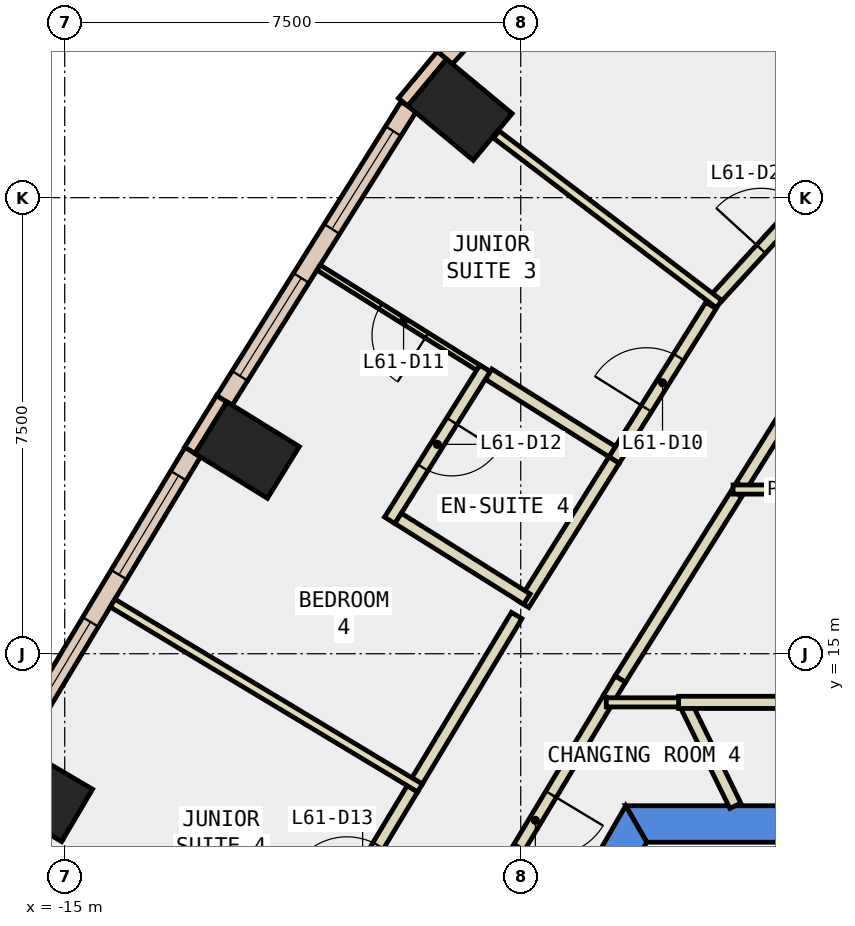
"""IFC4 building model, lengths in metres.
Left out: names, types, materials, properties, quantities, classifications, styles, units other than length and angle.
Written with IfcOpenShell. Run it as: python <this file> out.ifc"""

import sys

from ifc_helpers import new_model, si_unit, direction, frame, frame_2d, origin, origin_2d, place, context, subcontext, project, spatial, polyline, rectangle, outline, extrude, element, fill, save


model = new_model("IFC4")
c1 = context("Model", 3, precision=1e-05, world=origin(), true_north=direction((0.0, 1.0)))
c2 = subcontext(c1, "Body", "Model", "MODEL_VIEW")
j1 = project(units=[si_unit("LENGTHUNIT", "METRE"), si_unit("PLANEANGLEUNIT", "RADIAN")], contexts=[c1])
p1 = place(None, origin())
s1 = spatial("IfcSite", under=j1, at=p1, CompositionType="ELEMENT")
p2 = place(p1, origin())
s2 = spatial("IfcBuilding", under=s1, at=p2, CompositionType="ELEMENT")
p3 = place(p2, frame((0.0, 0.0, 266.6)))
s3 = spatial("IfcBuildingStorey", under=s2, at=p3, CompositionType="ELEMENT", Elevation=266.6)
for number, where, z_axis, x_axis in (
    (1, (-8.5, 23.946, -0.34), (0.0, 0.0, 1.0), (0.639, 0.769, 0.0)),
    (2, (-11.999, 18.349, -0.34), (0.0, 0.0, 1.0), (0.526, 0.851, 0.0)),
    (3, (-15.399, 12.697, -0.34), (0.0, 0.0, 1.0), (0.509, 0.861, 0.0)),
):
    element("IfcColumn", number, at=place(p3, frame(where, z_axis=z_axis, x_axis=x_axis)), inside=s3, PredefinedType="COLUMN", context=c2, shape_type="SweptSolid", body=[
        extrude(rectangle(XDim=1.0, YDim=1.4, at=origin_2d()), origin(), (0.0, 0.0, 1.0), 3.6),
    ])
p4 = place(p3, frame((0.0, 0.0, -0.34)))
e4 = element("IfcWall", 4, at=p4, inside=s3, PredefinedType="SHEAR", context=c2, shape_type="SweptSolid", body=[
    extrude(outline(polyline([(5.774, 12.5), (-5.774, 12.5), (-5.427, 11.9), (5.427, 11.9), (5.774, 12.5)])), origin(), (0.0, 0.0, 1.0), 3.6),
])
p5 = place(p3, frame((0.0, 0.0, -0.34)))
e5 = element("IfcWall", 5, at=p5, inside=s3, PredefinedType="SHEAR", context=c2, shape_type="SweptSolid", body=[
    extrude(outline(polyline([(-10.535, 4.253), (-10.015, 3.953), (-5.427, 11.9), (-5.774, 12.5), (-10.535, 4.253)])), origin(), (0.0, 0.0, 1.0), 3.6),
])
p6 = place(p3, frame((-8.796, 24.842, 0.0), z_axis=(0.0, 0.0, 1.0), x_axis=(-0.638117112481, -0.769939316283, 0.0)))
e6 = element("IfcWall", 6, at=p6, inside=s3, PredefinedType="STANDARD", context=c2, shape_type="SweptSolid", body=[
    extrude(rectangle(XDim=1.0, YDim=0.2, at=frame_2d((0.5, 0.0))), origin(), (0.0, 0.0, 1.0), 3.26),
])
p7 = place(p3, frame((-12.417, 19.195, 0.0), z_axis=(0.0, 0.0, 1.0), x_axis=(-0.525825307325, -0.850592585306, 0.0)))
e7 = element("IfcWall", 7, at=p7, inside=s3, PredefinedType="STANDARD", context=c2, shape_type="SweptSolid", body=[
    extrude(rectangle(XDim=1.0, YDim=0.2, at=frame_2d((0.5, 0.0))), origin(), (0.0, 0.0, 1.0), 3.26),
])
p8 = place(p3, frame((-5.782, 28.025, 0.0), z_axis=(0.0, 0.0, 1.0), x_axis=(-0.675143863554, -0.737686087374, 0.0)))
e8 = element("IfcWall", 8, at=p8, inside=s3, PredefinedType="STANDARD", context=c2, shape_type="SweptSolid", body=[
    extrude(rectangle(XDim=4.38, YDim=0.3, at=frame_2d((2.19, 0.0))), origin(), (0.0, 0.0, 1.0), 3.26),
])
p9 = place(p8, frame((1.49, 0.0, 0.9)))
e9 = element("IfcOpeningElement", 9, at=p9, cuts=e8, PredefinedType="OPENING", context=c2, shape_type="SweptSolid", body=[
    extrude(rectangle(XDim=1.4, YDim=2.0, at=frame_2d((0.7, 1.0))), frame((0.0, 0.16, 0.0), z_axis=(0.0, -1.0, 0.0), x_axis=(1.0, 0.0, 0.0)), (0.0, 0.0, 1.0), 0.32),
])
p10 = place(p3, frame((-9.343, 23.998, 0.0), z_axis=(0.0, 0.0, 1.0), x_axis=(-0.531137483242, -0.847285650708, 0.0)))
e10 = element("IfcWall", 10, at=p10, inside=s3, PredefinedType="STANDARD", context=c2, shape_type="SweptSolid", body=[
    extrude(rectangle(XDim=5.703, YDim=0.3, at=frame_2d((2.852, 0.0))), origin(), (0.0, 0.0, 1.0), 3.26),
])
p11 = place(p10, frame((0.476, 0.0, 0.9)))
e11 = element("IfcOpeningElement", 11, at=p11, cuts=e10, PredefinedType="OPENING", context=c2, shape_type="SweptSolid", body=[
    extrude(rectangle(XDim=1.9, YDim=2.0, at=frame_2d((0.95, 1.0))), frame((0.0, 0.16, 0.0), z_axis=(0.0, -1.0, 0.0), x_axis=(1.0, 0.0, 0.0)), (0.0, 0.0, 1.0), 0.32),
])
p12 = place(p10, frame((3.327, 0.0, 0.9)))
e12 = element("IfcOpeningElement", 12, at=p12, cuts=e10, PredefinedType="OPENING", context=c2, shape_type="SweptSolid", body=[
    extrude(rectangle(XDim=1.9, YDim=2.0, at=frame_2d((0.95, 1.0))), frame((0.0, 0.16, 0.0), z_axis=(0.0, -1.0, 0.0), x_axis=(1.0, 0.0, 0.0)), (0.0, 0.0, 1.0), 0.32),
])
p13 = place(p3, frame((-12.895, 18.316, 0.0), z_axis=(0.0, 0.0, 1.0), x_axis=(-0.515435742129, -0.856928232547, 0.0)))
e13 = element("IfcWall", 13, at=p13, inside=s3, PredefinedType="STANDARD", context=c2, shape_type="SweptSolid", body=[
    extrude(rectangle(XDim=5.613, YDim=0.3, at=frame_2d((2.806, 0.0))), origin(), (0.0, 0.0, 1.0), 3.26),
])
p14 = place(p13, frame((0.453, 0.0, 0.9)))
e14 = element("IfcOpeningElement", 14, at=p14, cuts=e13, PredefinedType="OPENING", context=c2, shape_type="SweptSolid", body=[
    extrude(rectangle(XDim=1.9, YDim=2.0, at=frame_2d((0.95, 1.0))), frame((0.0, 0.16, 0.0), z_axis=(0.0, -1.0, 0.0), x_axis=(1.0, 0.0, 0.0)), (0.0, 0.0, 1.0), 0.32),
])
p15 = place(p13, frame((3.26, 0.0, 0.9)))
e15 = element("IfcOpeningElement", 15, at=p15, cuts=e13, PredefinedType="OPENING", context=c2, shape_type="SweptSolid", body=[
    extrude(rectangle(XDim=1.9, YDim=2.0, at=frame_2d((0.95, 1.0))), frame((0.0, 0.16, 0.0), z_axis=(0.0, -1.0, 0.0), x_axis=(1.0, 0.0, 0.0)), (0.0, 0.0, 1.0), 0.32),
])
p16 = place(p3, frame((-3.97, 12.5, 0.0), z_axis=(0.0, 0.0, 1.0), x_axis=(-0.440355460167, 0.89782351757, 0.0)))
e16 = element("IfcWall", 16, at=p16, inside=s3, PredefinedType="PARTITIONING", context=c2, shape_type="SweptSolid", body=[
    extrude(rectangle(XDim=1.869, YDim=0.2, at=frame_2d((0.935, 0.0))), origin(), (0.0, 0.0, 1.0), 3.26),
])
p17 = place(p3, frame((-6.054, 14.264, 0.0), z_axis=(0.0, 0.0, 1.0), x_axis=(-0.515508653897, -0.856884372455, 0.0)))
e17 = element("IfcWall", 17, at=p17, inside=s3, PredefinedType="PARTITIONING", context=c2, shape_type="SweptSolid", body=[
    extrude(rectangle(XDim=4.677, YDim=0.2, at=frame_2d((2.339, 0.0))), origin(), (0.0, 0.0, 1.0), 3.26),
])
p18 = place(p17, frame((1.839, 0.0, 0.0)))
e18 = element("IfcOpeningElement", 18, at=p18, cuts=e17, PredefinedType="OPENING", context=c2, shape_type="SweptSolid", body=[
    extrude(rectangle(XDim=1.0, YDim=2.1, at=frame_2d((0.5, 1.05))), frame((0.0, 0.11, 0.0), z_axis=(0.0, -1.0, 0.0), x_axis=(1.0, 0.0, 0.0)), (0.0, 0.0, 1.0), 0.22),
])
p19 = place(p3, frame((-4.904, 14.2, 0.0), z_axis=(0.0, 0.0, 1.0), x_axis=(1.0, 0.0, 0.0)))
e19 = element("IfcWall", 19, at=p19, inside=s3, PredefinedType="PARTITIONING", context=c2, shape_type="SweptSolid", body=[
    extrude(rectangle(XDim=4.504, YDim=0.2, at=frame_2d((2.252, 0.0))), origin(), (0.0, 0.0, 1.0), 3.26),
])
p20 = place(p3, frame((-3.948, 17.636, 0.0), z_axis=(0.0, 0.0, 1.0), x_axis=(-0.531380509042, -0.847133256702, 0.0)))
e20 = element("IfcWall", 20, at=p20, inside=s3, PredefinedType="PARTITIONING", context=c2, shape_type="SweptSolid", body=[
    extrude(rectangle(XDim=3.604, YDim=0.2, at=frame_2d((1.802, 0.0))), origin(), (0.0, 0.0, 1.0), 3.26),
])
p21 = place(p3, frame((-5.863, 14.583, 0.0), z_axis=(0.0, 0.0, 1.0), x_axis=(-0.513433271491, -0.858129521533, 0.0)))
e21 = element("IfcWall", 21, at=p21, inside=s3, PredefinedType="PARTITIONING", context=c2, shape_type="SweptSolid", body=[
    extrude(rectangle(XDim=0.372, YDim=0.2, at=frame_2d((0.186, 0.0))), origin(), (0.0, 0.0, 1.0), 3.26),
])
p22 = place(p3, frame((-2.773, 19.511, 0.0), z_axis=(0.0, 0.0, 1.0), x_axis=(-0.531062870102, -0.847332418829, 0.0)))
e22 = element("IfcWall", 22, at=p22, inside=s3, PredefinedType="PARTITIONING", context=c2, shape_type="SweptSolid", body=[
    extrude(rectangle(XDim=2.062, YDim=0.2, at=frame_2d((1.031, 0.0))), origin(), (0.0, 0.0, 1.0), 3.26),
])
p23 = place(p3, frame((-4.335, 20.793, 0.0), z_axis=(0.0, 0.0, 1.0), x_axis=(0.675074517272, 0.737749548377, 0.0)))
e23 = element("IfcWall", 23, at=p23, inside=s3, PredefinedType="PARTITIONING", context=c2, shape_type="SweptSolid", body=[
    extrude(rectangle(XDim=3.334, YDim=0.2, at=frame_2d((1.667, 0.0))), origin(), (0.0, 0.0, 1.0), 3.26),
])
p24 = place(p23, frame((1.167, 0.0, 0.0)))
e24 = element("IfcOpeningElement", 24, at=p24, cuts=e23, PredefinedType="OPENING", context=c2, shape_type="SweptSolid", body=[
    extrude(rectangle(XDim=1.0, YDim=2.1, at=frame_2d((0.5, 1.05))), frame((0.0, 0.11, 0.0), z_axis=(0.0, -1.0, 0.0), x_axis=(1.0, 0.0, 0.0)), (0.0, 0.0, 1.0), 0.22),
])
p25 = place(p3, frame((-5.965, 18.185, 0.0), z_axis=(0.0, 0.0, 1.0), x_axis=(0.531256372055, 0.847211111324, 0.0)))
e25 = element("IfcWall", 25, at=p25, inside=s3, PredefinedType="PARTITIONING", context=c2, shape_type="SweptSolid", body=[
    extrude(rectangle(XDim=3.0, YDim=0.2, at=frame_2d((1.5, 0.0))), origin(), (0.0, 0.0, 1.0), 3.26),
])
p26 = place(p25, frame((1.0, 0.0, 0.0)))
e26 = element("IfcOpeningElement", 26, at=p26, cuts=e25, PredefinedType="OPENING", context=c2, shape_type="SweptSolid", body=[
    extrude(rectangle(XDim=1.0, YDim=2.1, at=frame_2d((0.5, 1.05))), frame((0.0, 0.11, 0.0), z_axis=(0.0, -1.0, 0.0), x_axis=(1.0, 0.0, 0.0)), (0.0, 0.0, 1.0), 0.22),
])
p27 = place(p3, frame((-9.204, 12.908, 0.0), z_axis=(0.0, 0.0, 1.0), x_axis=(0.51556943596, 0.856847802532, 0.0)))
e27 = element("IfcWall", 27, at=p27, inside=s3, PredefinedType="PARTITIONING", context=c2, shape_type="SweptSolid", body=[
    extrude(rectangle(XDim=3.176, YDim=0.2, at=frame_2d((1.588, 0.0))), origin(), (0.0, 0.0, 1.0), 3.26),
])
p28 = place(p3, frame((-7.452, 15.813, 0.0), z_axis=(0.0, 0.0, 1.0), x_axis=(0.531095943551, 0.847311689252, 0.0)))
e28 = element("IfcWall", 28, at=p28, inside=s3, PredefinedType="PARTITIONING", context=c2, shape_type="SweptSolid", body=[
    extrude(rectangle(XDim=2.8, YDim=0.2, at=frame_2d((1.4, 0.0))), origin(), (0.0, 0.0, 1.0), 3.26),
])
p29 = place(p3, frame((-10.919, 10.057, 0.0), z_axis=(0.0, 0.0, 1.0), x_axis=(0.515568955032, 0.856848091908, 0.0)))
e29 = element("IfcWall", 29, at=p29, inside=s3, PredefinedType="PARTITIONING", context=c2, shape_type="SweptSolid", body=[
    extrude(rectangle(XDim=3.177, YDim=0.2, at=frame_2d((1.588, 0.0))), origin(), (0.0, 0.0, 1.0), 3.26),
])
p30 = place(p29, frame((1.088, 0.0, 0.0)))
e30 = element("IfcOpeningElement", 30, at=p30, cuts=e29, PredefinedType="OPENING", context=c2, shape_type="SweptSolid", body=[
    extrude(rectangle(XDim=1.0, YDim=2.1, at=frame_2d((0.5, 1.05))), frame((0.0, 0.11, 0.0), z_axis=(0.0, -1.0, 0.0), x_axis=(1.0, 0.0, 0.0)), (0.0, 0.0, 1.0), 0.22),
])
p31 = place(p3, frame((-4.904, 14.2, 0.0), z_axis=(0.0, 0.0, 1.0), x_axis=(-1.0, 0.0, 0.0)))
e31 = element("IfcWall", 31, at=p31, inside=s3, PredefinedType="PARTITIONING", context=c2, shape_type="SweptSolid", body=[
    extrude(rectangle(XDim=1.189, YDim=0.15, at=frame_2d((0.594, 0.0))), origin(), (0.0, 0.0, 1.0), 3.26),
])
p32 = place(p3, frame((-4.008, 17.7, 0.0), z_axis=(0.0, 0.0, 1.0), x_axis=(1.0, 0.0, 0.0)))
e32 = element("IfcWall", 32, at=p32, inside=s3, PredefinedType="PARTITIONING", context=c2, shape_type="SweptSolid", body=[
    extrude(rectangle(XDim=3.608, YDim=0.15, at=frame_2d((1.804, 0.0))), origin(), (0.0, 0.0, 1.0), 3.26),
])
p33 = place(p3, frame((-4.238, 20.751, 0.0), z_axis=(0.0, 0.0, 1.0), x_axis=(-0.795806473987, 0.605551034976, 0.0)))
e33 = element("IfcWall", 33, at=p33, inside=s3, PredefinedType="PARTITIONING", context=c2, shape_type="SweptSolid", body=[
    extrude(rectangle(XDim=4.604, YDim=0.15, at=frame_2d((2.302, 0.0))), origin(), (0.0, 0.0, 1.0), 3.26),
])
p34 = place(p3, frame((-8.029, 19.598, 0.0), z_axis=(0.0, 0.0, 1.0), x_axis=(-0.847216023371, 0.531248538581, 0.0)))
e34 = element("IfcWall", 34, at=p34, inside=s3, PredefinedType="PARTITIONING", context=c2, shape_type="SweptSolid", body=[
    extrude(rectangle(XDim=3.3, YDim=0.1, at=frame_2d((1.65, 0.0))), origin(), (0.0, 0.0, 1.0), 3.26),
])
p35 = place(p34, frame((1.2, 0.0, 0.0)))
e35 = element("IfcOpeningElement", 35, at=p35, cuts=e34, PredefinedType="OPENING", context=c2, shape_type="SweptSolid", body=[
    extrude(rectangle(XDim=0.9, YDim=2.1, at=frame_2d((0.45, 1.05))), frame((0.0, 0.06, 0.0), z_axis=(0.0, -1.0, 0.0), x_axis=(1.0, 0.0, 0.0)), (0.0, 0.0, 1.0), 0.12),
])
p36 = place(p3, frame((-5.996, 18.323, 0.0), z_axis=(0.0, 0.0, 1.0), x_axis=(-0.847191403331, 0.531287799711, 0.0)))
e36 = element("IfcWall", 36, at=p36, inside=s3, PredefinedType="PARTITIONING", context=c2, shape_type="SweptSolid", body=[
    extrude(rectangle(XDim=2.4, YDim=0.2, at=frame_2d((1.2, 0.0))), origin(), (0.0, 0.0, 1.0), 3.26),
])
p37 = place(p3, frame((-8.088, 19.693, 0.0), z_axis=(0.0, 0.0, 1.0), x_axis=(-0.531277961984, -0.847197572654, 0.0)))
e37 = element("IfcWall", 37, at=p37, inside=s3, PredefinedType="PARTITIONING", context=c2, shape_type="SweptSolid", body=[
    extrude(rectangle(XDim=2.95, YDim=0.2, at=frame_2d((1.475, 0.0))), origin(), (0.0, 0.0, 1.0), 3.26),
])
p38 = place(p37, frame((1.025, 0.0, 0.0)))
e38 = element("IfcOpeningElement", 38, at=p38, cuts=e37, PredefinedType="OPENING", context=c2, shape_type="SweptSolid", body=[
    extrude(rectangle(XDim=0.9, YDim=2.1, at=frame_2d((0.45, 1.05))), frame((0.0, 0.11, 0.0), z_axis=(0.0, -1.0, 0.0), x_axis=(1.0, 0.0, 0.0)), (0.0, 0.0, 1.0), 0.22),
])
p39 = place(p3, frame((-9.517, 17.226, 0.0), z_axis=(0.0, 0.0, 1.0), x_axis=(0.847229363594, -0.53122726348, 0.0)))
e39 = element("IfcWall", 39, at=p39, inside=s3, PredefinedType="PARTITIONING", context=c2, shape_type="SweptSolid", body=[
    extrude(rectangle(XDim=2.5, YDim=0.2, at=frame_2d((1.25, 0.0))), origin(), (0.0, 0.0, 1.0), 3.26),
])
p40 = place(p3, frame((-9.157, 12.792, 0.0), z_axis=(0.0, 0.0, 1.0), x_axis=(-0.856933793276, 0.515426497129, 0.0)))
e40 = element("IfcWall", 40, at=p40, inside=s3, PredefinedType="PARTITIONING", context=c2, shape_type="SweptSolid", body=[
    extrude(rectangle(XDim=5.9, YDim=0.15, at=frame_2d((2.95, 0.0))), origin(), (0.0, 0.0, 1.0), 3.26),
])
p41 = place(p11, origin())
e41 = element("IfcWindow", 41, at=p41, inside=s3, PartitioningType="SINGLE_PANEL", PredefinedType="WINDOW", context=c2, shape_type="SweptSolid", body=[
    extrude(rectangle(XDim=1.9, YDim=2.0, at=frame_2d((0.95, 1.0))), frame((0.0, 0.03, 0.0), z_axis=(0.0, -1.0, 0.0), x_axis=(1.0, 0.0, 0.0)), (0.0, 0.0, 1.0), 0.06),
])
fill(e11, e41)
p42 = place(p12, origin())
e42 = element("IfcWindow", 42, at=p42, inside=s3, PartitioningType="SINGLE_PANEL", PredefinedType="WINDOW", context=c2, shape_type="SweptSolid", body=[
    extrude(rectangle(XDim=1.9, YDim=2.0, at=frame_2d((0.95, 1.0))), frame((0.0, 0.03, 0.0), z_axis=(0.0, -1.0, 0.0), x_axis=(1.0, 0.0, 0.0)), (0.0, 0.0, 1.0), 0.06),
])
fill(e12, e42)
p43 = place(p14, origin())
e43 = element("IfcWindow", 43, at=p43, inside=s3, PartitioningType="SINGLE_PANEL", PredefinedType="WINDOW", context=c2, shape_type="SweptSolid", body=[
    extrude(rectangle(XDim=1.9, YDim=2.0, at=frame_2d((0.95, 1.0))), frame((0.0, 0.03, 0.0), z_axis=(0.0, -1.0, 0.0), x_axis=(1.0, 0.0, 0.0)), (0.0, 0.0, 1.0), 0.06),
])
fill(e14, e43)
p44 = place(p15, origin())
e44 = element("IfcWindow", 44, at=p44, inside=s3, PartitioningType="SINGLE_PANEL", PredefinedType="WINDOW", context=c2, shape_type="SweptSolid", body=[
    extrude(rectangle(XDim=1.9, YDim=2.0, at=frame_2d((0.95, 1.0))), frame((0.0, 0.03, 0.0), z_axis=(0.0, -1.0, 0.0), x_axis=(1.0, 0.0, 0.0)), (0.0, 0.0, 1.0), 0.06),
])
fill(e15, e44)
p45 = place(p26, origin())
e45 = element("IfcDoor", 45, at=p45, inside=s3, OperationType="SINGLE_SWING_LEFT", PredefinedType="DOOR", context=c2, shape_type="SweptSolid", body=[
    extrude(rectangle(XDim=1.0, YDim=2.1, at=frame_2d((0.5, 1.05))), frame((0.0, 0.025, 0.0), z_axis=(0.0, -1.0, 0.0), x_axis=(1.0, 0.0, 0.0)), (0.0, 0.0, 1.0), 0.05),
])
fill(e26, e45)
p46 = place(p35, origin())
e46 = element("IfcDoor", 46, at=p46, inside=s3, OperationType="SINGLE_SWING_RIGHT", PredefinedType="DOOR", context=c2, shape_type="SweptSolid", body=[
    extrude(rectangle(XDim=0.9, YDim=2.1, at=frame_2d((0.45, 1.05))), frame((0.0, 0.025, 0.0), z_axis=(0.0, -1.0, 0.0), x_axis=(1.0, 0.0, 0.0)), (0.0, 0.0, 1.0), 0.05),
])
fill(e35, e46)
p47 = place(p38, origin())
e47 = element("IfcDoor", 47, at=p47, inside=s3, OperationType="SINGLE_SWING_LEFT", PredefinedType="DOOR", context=c2, shape_type="SweptSolid", body=[
    extrude(rectangle(XDim=0.9, YDim=2.1, at=frame_2d((0.45, 1.05))), frame((0.0, 0.025, 0.0), z_axis=(0.0, -1.0, 0.0), x_axis=(1.0, 0.0, 0.0)), (0.0, 0.0, 1.0), 0.05),
])
fill(e38, e47)
p48 = place(p30, origin())
e48 = element("IfcDoor", 48, at=p48, inside=s3, OperationType="SINGLE_SWING_LEFT", PredefinedType="DOOR", context=c2, shape_type="SweptSolid", body=[
    extrude(rectangle(XDim=1.0, YDim=2.1, at=frame_2d((0.5, 1.05))), frame((0.0, 0.025, 0.0), z_axis=(0.0, -1.0, 0.0), x_axis=(1.0, 0.0, 0.0)), (0.0, 0.0, 1.0), 0.05),
])
fill(e30, e48)
p49 = place(p24, origin())
e49 = element("IfcDoor", 49, at=p49, inside=s3, OperationType="SINGLE_SWING_LEFT", PredefinedType="DOOR", context=c2, shape_type="SweptSolid", body=[
    extrude(rectangle(XDim=1.0, YDim=2.1, at=frame_2d((0.5, 1.05))), frame((0.0, 0.025, 0.0), z_axis=(0.0, -1.0, 0.0), x_axis=(1.0, 0.0, 0.0)), (0.0, 0.0, 1.0), 0.05),
])
fill(e24, e49)
p50 = place(p18, origin())
e50 = element("IfcDoor", 50, at=p50, inside=s3, OperationType="SINGLE_SWING_LEFT", PredefinedType="DOOR", context=c2, shape_type="SweptSolid", body=[
    extrude(rectangle(XDim=1.0, YDim=2.1, at=frame_2d((0.5, 1.05))), frame((0.0, 0.025, 0.0), z_axis=(0.0, -1.0, 0.0), x_axis=(1.0, 0.0, 0.0)), (0.0, 0.0, 1.0), 0.05),
])
fill(e18, e50)
save(model, sys.argv[1])
